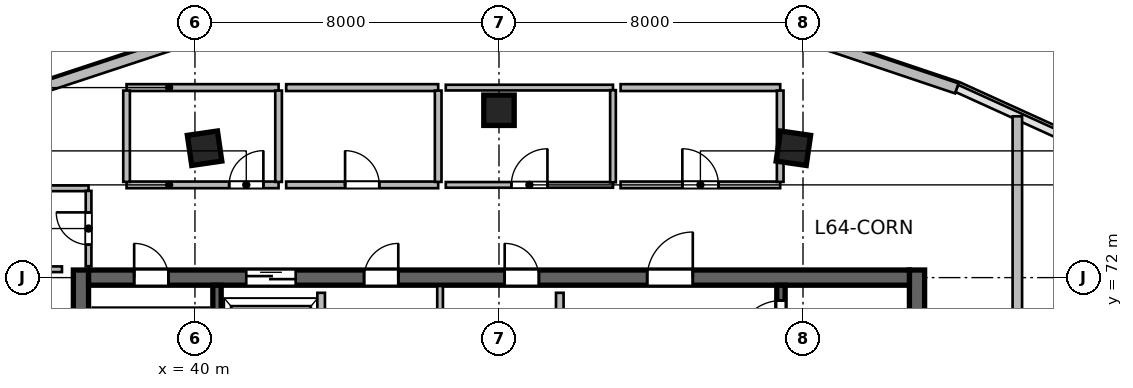
"""IFC4 building model, lengths in metres.
Left out: names, types, materials, properties, quantities, classifications, styles, units other than length and angle.
Written with IfcOpenShell. Run it as: python <this file> out.ifc"""

import sys

from ifc_helpers import new_model, si_unit, direction, frame, frame_2d, origin, origin_2d, place, context, subcontext, project, spatial, rectangle, extrude, source, transform, mapped, element, fill, save


model = new_model("IFC4")
c1 = context("Model", 3, precision=1e-05, world=origin(), true_north=direction((0.0, 1.0)))
c2 = subcontext(c1, "Body", "Model", "MODEL_VIEW")
j1 = project(units=[si_unit("LENGTHUNIT", "METRE"), si_unit("PLANEANGLEUNIT", "RADIAN")], contexts=[c1])
p1 = place(None, origin())
s1 = spatial("IfcSite", under=j1, at=p1, CompositionType="ELEMENT")
p2 = place(p1, origin())
s2 = spatial("IfcBuilding", under=s1, at=p2, CompositionType="ELEMENT")
p3 = place(p2, frame((0.0, 0.0, 264.0)))
s3 = spatial("IfcBuildingStorey", under=s2, at=p3, CompositionType="ELEMENT", Elevation=264.0)
m1 = source(origin(), c2, "Body", "SweptSolid", [
    extrude(rectangle(XDim=12.0, YDim=0.4, at=frame_2d((6.0, 0.0))), origin(), (0.0, 0.0, 1.0), 3.9),
])
for number, where, z_axis, x_axis in (
    (1, (37.0, 60.2, 0.0), (0.0, 0.0, 1.0), (0.0, 1.0, 0.0)),
    (2, (59.0, 60.2, 0.0), (0.0, 0.0, 1.0), (0.0, 1.0, 0.0)),
):
    element("IfcWall", number, at=place(p3, frame(where, z_axis=z_axis, x_axis=x_axis)), inside=s3, PredefinedType="SHEAR", context=c2, shape_type="MappedRepresentation", body=[
        mapped(m1, transform((0.0, 0.0, 0.0), scale=1.0)),
    ])
m2 = source(origin(), c2, "Body", "SweptSolid", [
    extrude(rectangle(XDim=21.6, YDim=0.4, at=frame_2d((10.8, 0.0))), origin(), (0.0, 0.0, 1.0), 3.9),
])
p4 = place(p3, frame((37.2, 72.0, 0.0), z_axis=(0.0, 0.0, 1.0), x_axis=(1.0, 0.0, 0.0)))
e3 = element("IfcWall", 3, at=p4, inside=s3, PredefinedType="SHEAR", context=c2, shape_type="MappedRepresentation", body=[
    mapped(m2, transform((0.0, 0.0, 0.0), scale=1.0)),
])
p5 = place(p4, frame((1.2, 0.0, 0.0)))
e4 = element("IfcOpeningElement", 4, at=p5, cuts=e3, PredefinedType="OPENING", context=c2, shape_type="SweptSolid", body=[
    extrude(rectangle(XDim=0.9, YDim=2.1, at=frame_2d((0.45, 1.05))), frame((0.0, 0.21, 0.0), z_axis=(0.0, -1.0, 0.0), x_axis=(1.0, 0.0, 0.0)), (0.0, 0.0, 1.0), 0.42),
])
p6 = place(p4, frame((14.7, 0.0, 0.0)))
e5 = element("IfcOpeningElement", 5, at=p6, cuts=e3, PredefinedType="OPENING", context=c2, shape_type="SweptSolid", body=[
    extrude(rectangle(XDim=1.2, YDim=2.15, at=frame_2d((0.6, 1.075))), frame((0.0, 0.21, 0.0), z_axis=(0.0, -1.0, 0.0), x_axis=(1.0, 0.0, 0.0)), (0.0, 0.0, 1.0), 0.42),
])
p7 = place(p4, frame((4.15, 0.0, 0.0)))
e6 = element("IfcOpeningElement", 6, at=p7, cuts=e3, PredefinedType="OPENING", context=c2, shape_type="SweptSolid", body=[
    extrude(rectangle(XDim=1.3, YDim=2.15, at=frame_2d((0.65, 1.075))), frame((0.0, 0.21, 0.0), z_axis=(0.0, -1.0, 0.0), x_axis=(1.0, 0.0, 0.0)), (0.0, 0.0, 1.0), 0.42),
])
p8 = place(p4, frame((7.25, 0.0, 0.0)))
e7 = element("IfcOpeningElement", 7, at=p8, cuts=e3, PredefinedType="OPENING", context=c2, shape_type="SweptSolid", body=[
    extrude(rectangle(XDim=0.9, YDim=2.1, at=frame_2d((0.45, 1.05))), frame((0.0, 0.21, 0.0), z_axis=(0.0, -1.0, 0.0), x_axis=(1.0, 0.0, 0.0)), (0.0, 0.0, 1.0), 0.42),
])
p9 = place(p4, frame((10.95, 0.0, 0.0)))
e8 = element("IfcOpeningElement", 8, at=p9, cuts=e3, PredefinedType="OPENING", context=c2, shape_type="SweptSolid", body=[
    extrude(rectangle(XDim=0.9, YDim=2.1, at=frame_2d((0.45, 1.05))), frame((0.0, 0.21, 0.0), z_axis=(0.0, -1.0, 0.0), x_axis=(1.0, 0.0, 0.0)), (0.0, 0.0, 1.0), 0.42),
])
m3 = source(origin(), c2, "Body", "SweptSolid", [
    extrude(rectangle(XDim=11.2, YDim=0.22, at=frame_2d((5.6, 0.0))), origin(), (0.0, 0.0, 1.0), 3.9),
])
p10 = place(p3, frame((40.58, 60.6, 0.0), z_axis=(0.0, 0.0, 1.0), x_axis=(0.0, 1.0, 0.0)))
e9 = element("IfcWall", 9, at=p10, inside=s3, PredefinedType="SHEAR", context=c2, shape_type="MappedRepresentation", body=[
    mapped(m3, transform((0.0, 0.0, 0.0), scale=1.0)),
])
p11 = place(p3, frame((55.42, 60.6, 0.0), z_axis=(0.0, 0.0, 1.0), x_axis=(0.0, 1.0, 0.0)))
e10 = element("IfcWall", 10, at=p11, inside=s3, PredefinedType="SHEAR", context=c2, shape_type="MappedRepresentation", body=[
    mapped(m3, transform((0.0, 0.0, 0.0), scale=1.0)),
])
p12 = place(p11, frame((9.645, 0.0, 0.0)))
e11 = element("IfcOpeningElement", 11, at=p12, cuts=e10, PredefinedType="OPENING", context=c2, shape_type="SweptSolid", body=[
    extrude(rectangle(XDim=1.15, YDim=2.15, at=frame_2d((0.575, 1.075))), frame((0.0, 0.12, 0.0), z_axis=(0.0, -1.0, 0.0), x_axis=(1.0, 0.0, 0.0)), (0.0, 0.0, 1.0), 0.24),
])
m4 = source(origin(), c2, "Body", "SweptSolid", [
    extrude(rectangle(XDim=0.8, YDim=0.8, at=origin_2d()), origin(), (0.0, 0.0, 1.0), 3.9),
])
for number, where, z_axis, x_axis in (
    (12, (40.253, 75.404, 0.0), (0.0, 0.0, 1.0), (-0.143, 0.99, 0.0)),
    (13, (48.0, 76.404, 0.0), (0.0, 0.0, 1.0), (0.0, 1.0, 0.0)),
    (14, (55.747, 75.404, 0.0), (0.0, 0.0, 1.0), (0.143, 0.99, 0.0)),
):
    element("IfcColumn", number, at=place(p3, frame(where, z_axis=z_axis, x_axis=x_axis)), inside=s3, PredefinedType="COLUMN", context=c2, shape_type="MappedRepresentation", body=[
        mapped(m4, transform((0.0, 0.0, 0.0), scale=1.0)),
    ])
m5 = source(origin(), c2, "Body", "SweptSolid", [
    extrude(rectangle(XDim=3.54, YDim=0.28, at=frame_2d((1.77, 0.0))), origin(), (0.0, 0.0, 1.0), 3.65),
])
p13 = place(p3, frame((36.132, 77.049, 0.0), z_axis=(0.0, 0.0, 1.0), x_axis=(0.949678507031, 0.313226329165, 0.0)))
e15 = element("IfcWall", 15, at=p13, inside=s3, PredefinedType="SOLIDWALL", context=c2, shape_type="MappedRepresentation", body=[
    mapped(m5, transform((0.0, 0.0, 0.0), scale=1.0)),
])
m6 = source(origin(), c2, "Body", "SweptSolid", [
    extrude(rectangle(XDim=3.543, YDim=0.28, at=frame_2d((1.771, 0.0))), origin(), (0.0, 0.0, 1.0), 3.65),
])
p14 = place(p3, frame((56.688, 78.108, 0.0), z_axis=(0.0, 0.0, 1.0), x_axis=(0.947922565312, -0.318500879389, 0.0)))
e16 = element("IfcWall", 16, at=p14, inside=s3, PredefinedType="SOLIDWALL", context=c2, shape_type="MappedRepresentation", body=[
    mapped(m6, transform((0.0, 0.0, 0.0), scale=1.0)),
])
m7 = source(origin(), c2, "Body", "SweptSolid", [
    extrude(rectangle(XDim=5.8, YDim=0.2, at=frame_2d((2.9, 0.0))), origin(), (0.0, 0.0, 1.0), 3.65),
])
p15 = place(p3, frame((49.6, 65.8, 0.0), z_axis=(0.0, 0.0, 1.0), x_axis=(0.0, 1.0, 0.0)))
e17 = element("IfcWall", 17, at=p15, inside=s3, PredefinedType="SOLIDWALL", context=c2, shape_type="MappedRepresentation", body=[
    mapped(m7, transform((0.0, 0.0, 0.0), scale=1.0)),
])
m8 = source(origin(), c2, "Body", "SweptSolid", [
    extrude(rectangle(XDim=3.2, YDim=0.2, at=frame_2d((1.6, 0.0))), origin(), (0.0, 0.0, 1.0), 3.65),
])
p16 = place(p3, frame((43.32, 68.4, 0.0), z_axis=(0.0, 0.0, 1.0), x_axis=(0.0, 1.0, 0.0)))
e18 = element("IfcWall", 18, at=p16, inside=s3, PredefinedType="SOLIDWALL", context=c2, shape_type="MappedRepresentation", body=[
    mapped(m8, transform((0.0, 0.0, 0.0), scale=1.0)),
])
m9 = source(origin(), c2, "Body", "SweptSolid", [
    extrude(rectangle(XDim=3.38, YDim=0.15, at=frame_2d((1.69, 0.0))), origin(), (0.0, 0.0, 1.0), 3.65),
])
p17 = place(p3, frame((46.45, 68.4, 0.0), z_axis=(0.0, 0.0, 1.0), x_axis=(0.0, 1.0, 0.0)))
e19 = element("IfcWall", 19, at=p17, inside=s3, PredefinedType="PARTITIONING", context=c2, shape_type="MappedRepresentation", body=[
    mapped(m9, transform((0.0, 0.0, 0.0), scale=1.0)),
])
m10 = source(origin(), c2, "Body", "SweptSolid", [
    extrude(rectangle(XDim=2.1, YDim=0.15, at=frame_2d((1.05, 0.0))), origin(), (0.0, 0.0, 1.0), 3.65),
])
p18 = place(p3, frame((34.4, 72.22, 0.0), z_axis=(0.0, 0.0, 1.0), x_axis=(1.0, 0.0, 0.0)))
e20 = element("IfcWall", 20, at=p18, inside=s3, PredefinedType="PARTITIONING", context=c2, shape_type="MappedRepresentation", body=[
    mapped(m10, transform((0.0, 0.0, 0.0), scale=1.0)),
])
m11 = source(origin(), c2, "Body", "SweptSolid", [
    extrude(rectangle(XDim=2.8, YDim=0.15, at=frame_2d((1.4, 0.0))), origin(), (0.0, 0.0, 1.0), 3.65),
])
p19 = place(p3, frame((34.4, 74.35, 0.0), z_axis=(0.0, 0.0, 1.0), x_axis=(1.0, 0.0, 0.0)))
e21 = element("IfcWall", 21, at=p19, inside=s3, PredefinedType="PARTITIONING", context=c2, shape_type="MappedRepresentation", body=[
    mapped(m11, transform((0.0, 0.0, 0.0), scale=1.0)),
])
m12 = source(origin(), c2, "Body", "SweptSolid", [
    extrude(rectangle(XDim=1.982, YDim=0.15, at=frame_2d((0.991, 0.0))), origin(), (0.0, 0.0, 1.0), 3.65),
])
p20 = place(p3, frame((37.2, 72.3, 0.0), z_axis=(0.0, 0.0, 1.0), x_axis=(0.0, 1.0, 0.0)))
e22 = element("IfcWall", 22, at=p20, inside=s3, PredefinedType="PARTITIONING", context=c2, shape_type="MappedRepresentation", body=[
    mapped(m12, transform((0.0, 0.0, 0.0), scale=1.0)),
])
p21 = place(p20, frame((0.566, 0.0, 0.0)))
e23 = element("IfcOpeningElement", 23, at=p21, cuts=e22, PredefinedType="OPENING", context=c2, shape_type="SweptSolid", body=[
    extrude(rectangle(XDim=0.85, YDim=2.1, at=frame_2d((0.425, 1.05))), frame((0.0, 0.085, 0.0), z_axis=(0.0, -1.0, 0.0), x_axis=(1.0, 0.0, 0.0)), (0.0, 0.0, 1.0), 0.17),
])
m13 = source(origin(), c2, "Body", "SweptSolid", [
    extrude(rectangle(XDim=4.0, YDim=0.175, at=frame_2d((2.0, 0.0))), origin(), (0.0, 0.0, 1.0), 3.65),
])
p22 = place(p3, frame((38.2, 74.44, 0.0), z_axis=(0.0, 0.0, 1.0), x_axis=(1.0, 0.0, 0.0)))
e24 = element("IfcWall", 24, at=p22, inside=s3, PredefinedType="PARTITIONING", context=c2, shape_type="MappedRepresentation", body=[
    mapped(m13, transform((0.0, 0.0, 0.0), scale=1.0)),
])
p23 = place(p22, frame((2.7, 0.0, 0.0)))
e25 = element("IfcOpeningElement", 25, at=p23, cuts=e24, PredefinedType="OPENING", context=c2, shape_type="SweptSolid", body=[
    extrude(rectangle(XDim=0.9, YDim=2.08, at=frame_2d((0.45, 1.04))), frame((0.0, 0.098, 0.0), z_axis=(0.0, -1.0, 0.0), x_axis=(1.0, 0.0, 0.0)), (0.0, 0.0, 1.0), 0.195),
])
m14 = source(origin(), c2, "Body", "SweptSolid", [
    extrude(rectangle(XDim=4.0, YDim=0.18, at=frame_2d((2.0, 0.0))), origin(), (0.0, 0.0, 1.0), 3.65),
])
p24 = place(p3, frame((38.2, 77.0, 0.0), z_axis=(0.0, 0.0, 1.0), x_axis=(1.0, 0.0, 0.0)))
e26 = element("IfcWall", 26, at=p24, inside=s3, PredefinedType="PLUMBINGWALL", context=c2, shape_type="MappedRepresentation", body=[
    mapped(m14, transform((0.0, 0.0, 0.0), scale=1.0)),
])
m15 = source(origin(), c2, "Body", "SweptSolid", [
    extrude(rectangle(XDim=2.403, YDim=0.175, at=frame_2d((1.201, 0.0))), origin(), (0.0, 0.0, 1.0), 3.65),
])
for number, where, z_axis, x_axis in (
    (27, (38.2, 74.519, 0.0), (0.0, 0.0, 1.0), (0.0, 1.0, 0.0)),
    (28, (42.2, 74.519, 0.0), (0.0, 0.0, 1.0), (0.0, 1.0, 0.0)),
):
    element("IfcWall", number, at=place(p3, frame(where, z_axis=z_axis, x_axis=x_axis)), inside=s3, PredefinedType="PARTITIONING", context=c2, shape_type="MappedRepresentation", body=[
        mapped(m15, transform((0.0, 0.0, 0.0), scale=1.0)),
    ])
p25 = place(p3, frame((42.4, 74.44, 0.0), z_axis=(0.0, 0.0, 1.0), x_axis=(1.0, 0.0, 0.0)))
e29 = element("IfcWall", 29, at=p25, inside=s3, PredefinedType="PARTITIONING", context=c2, shape_type="MappedRepresentation", body=[
    mapped(m13, transform((0.0, 0.0, 0.0), scale=1.0)),
])
p26 = place(p25, frame((1.55, 0.0, 0.0)))
e30 = element("IfcOpeningElement", 30, at=p26, cuts=e29, PredefinedType="OPENING", context=c2, shape_type="SweptSolid", body=[
    extrude(rectangle(XDim=0.9, YDim=2.08, at=frame_2d((0.45, 1.04))), frame((0.0, 0.098, 0.0), z_axis=(0.0, -1.0, 0.0), x_axis=(1.0, 0.0, 0.0)), (0.0, 0.0, 1.0), 0.195),
])
p27 = place(p3, frame((42.4, 77.0, 0.0), z_axis=(0.0, 0.0, 1.0), x_axis=(1.0, 0.0, 0.0)))
e31 = element("IfcWall", 31, at=p27, inside=s3, PredefinedType="PLUMBINGWALL", context=c2, shape_type="MappedRepresentation", body=[
    mapped(m14, transform((0.0, 0.0, 0.0), scale=1.0)),
])
p28 = place(p3, frame((46.4, 74.519, 0.0), z_axis=(0.0, 0.0, 1.0), x_axis=(0.0, 1.0, 0.0)))
e32 = element("IfcWall", 32, at=p28, inside=s3, PredefinedType="PARTITIONING", context=c2, shape_type="MappedRepresentation", body=[
    mapped(m15, transform((0.0, 0.0, 0.0), scale=1.0)),
])
m16 = source(origin(), c2, "Body", "SweptSolid", [
    extrude(rectangle(XDim=4.4, YDim=0.15, at=frame_2d((2.2, 0.0))), origin(), (0.0, 0.0, 1.0), 3.65),
])
p29 = place(p3, frame((46.6, 74.44, 0.0), z_axis=(0.0, 0.0, 1.0), x_axis=(1.0, 0.0, 0.0)))
e33 = element("IfcWall", 33, at=p29, inside=s3, PredefinedType="PARTITIONING", context=c2, shape_type="MappedRepresentation", body=[
    mapped(m16, transform((0.0, 0.0, 0.0), scale=1.0)),
])
p30 = place(p29, frame((1.725, 0.0, 0.0)))
e34 = element("IfcOpeningElement", 34, at=p30, cuts=e33, PredefinedType="OPENING", context=c2, shape_type="SweptSolid", body=[
    extrude(rectangle(XDim=0.95, YDim=2.1, at=frame_2d((0.475, 1.05))), frame((0.0, 0.085, 0.0), z_axis=(0.0, -1.0, 0.0), x_axis=(1.0, 0.0, 0.0)), (0.0, 0.0, 1.0), 0.17),
])
p31 = place(p3, frame((46.6, 77.0, 0.0), z_axis=(0.0, 0.0, 1.0), x_axis=(1.0, 0.0, 0.0)))
e35 = element("IfcWall", 35, at=p31, inside=s3, PredefinedType="PARTITIONING", context=c2, shape_type="MappedRepresentation", body=[
    mapped(m16, transform((0.0, 0.0, 0.0), scale=1.0)),
])
m17 = source(origin(), c2, "Body", "SweptSolid", [
    extrude(rectangle(XDim=2.425, YDim=0.15, at=frame_2d((1.212, 0.0))), origin(), (0.0, 0.0, 1.0), 3.65),
])
p32 = place(p3, frame((51.0, 74.508, 0.0), z_axis=(0.0, 0.0, 1.0), x_axis=(0.0, 1.0, 0.0)))
e36 = element("IfcWall", 36, at=p32, inside=s3, PredefinedType="PARTITIONING", context=c2, shape_type="MappedRepresentation", body=[
    mapped(m17, transform((0.0, 0.0, 0.0), scale=1.0)),
])
m18 = source(origin(), c2, "Body", "SweptSolid", [
    extrude(rectangle(XDim=4.2, YDim=0.175, at=frame_2d((2.1, 0.0))), origin(), (0.0, 0.0, 1.0), 3.65),
])
p33 = place(p3, frame((51.2, 74.44, 0.0), z_axis=(0.0, 0.0, 1.0), x_axis=(1.0, 0.0, 0.0)))
e37 = element("IfcWall", 37, at=p33, inside=s3, PredefinedType="PARTITIONING", context=c2, shape_type="MappedRepresentation", body=[
    mapped(m18, transform((0.0, 0.0, 0.0), scale=1.0)),
])
p34 = place(p33, frame((1.625, 0.0, 0.0)))
e38 = element("IfcOpeningElement", 38, at=p34, cuts=e37, PredefinedType="OPENING", context=c2, shape_type="SweptSolid", body=[
    extrude(rectangle(XDim=0.95, YDim=2.12, at=frame_2d((0.475, 1.06))), frame((0.0, 0.098, 0.0), z_axis=(0.0, -1.0, 0.0), x_axis=(1.0, 0.0, 0.0)), (0.0, 0.0, 1.0), 0.195),
])
m19 = source(origin(), c2, "Body", "SweptSolid", [
    extrude(rectangle(XDim=4.2, YDim=0.18, at=frame_2d((2.1, 0.0))), origin(), (0.0, 0.0, 1.0), 3.65),
])
p35 = place(p3, frame((51.2, 77.0, 0.0), z_axis=(0.0, 0.0, 1.0), x_axis=(1.0, 0.0, 0.0)))
e39 = element("IfcWall", 39, at=p35, inside=s3, PredefinedType="PLUMBINGWALL", context=c2, shape_type="MappedRepresentation", body=[
    mapped(m19, transform((0.0, 0.0, 0.0), scale=1.0)),
])
p36 = place(p3, frame((55.4, 74.519, 0.0), z_axis=(0.0, 0.0, 1.0), x_axis=(0.0, 1.0, 0.0)))
e40 = element("IfcWall", 40, at=p36, inside=s3, PredefinedType="PARTITIONING", context=c2, shape_type="MappedRepresentation", body=[
    mapped(m15, transform((0.0, 0.0, 0.0), scale=1.0)),
])
m20 = source(origin(), c2, "Body", "SweptSolid", [
    extrude(rectangle(XDim=11.445, YDim=0.25, at=frame_2d((5.722, 0.0))), origin(), (0.0, 0.0, 1.0), 3.65),
])
p37 = place(p3, frame((61.64, 64.8, 0.0), z_axis=(0.0, 0.0, 1.0), x_axis=(0.0, 1.0, 0.0)))
e41 = element("IfcWall", 41, at=p37, inside=s3, PredefinedType="PARTITIONING", context=c2, shape_type="MappedRepresentation", body=[
    mapped(m20, transform((0.0, 0.0, 0.0), scale=1.0)),
])
p38 = place(p37, frame((5.247, 0.0, 0.0)))
e42 = element("IfcOpeningElement", 42, at=p38, cuts=e41, PredefinedType="OPENING", context=c2, shape_type="SweptSolid", body=[
    extrude(rectangle(XDim=0.95, YDim=2.1, at=frame_2d((0.475, 1.05))), frame((0.0, 0.135, 0.0), z_axis=(0.0, -1.0, 0.0), x_axis=(1.0, 0.0, 0.0)), (0.0, 0.0, 1.0), 0.27),
])
m21 = source(origin(), c2, "Body", "SweptSolid", [
    extrude(rectangle(XDim=0.9, YDim=2.1, at=frame_2d((0.45, 1.05))), frame((0.0, 0.025, 0.0), z_axis=(0.0, -1.0, 0.0), x_axis=(1.0, 0.0, 0.0)), (0.0, 0.0, 1.0), 0.05),
])
p39 = place(p5, origin())
e43 = element("IfcDoor", 43, at=p39, inside=s3, OperationType="SINGLE_SWING_LEFT", PredefinedType="DOOR", context=c2, shape_type="MappedRepresentation", body=[
    mapped(m21, transform((0.0, 0.0, 0.0), scale=1.0)),
])
fill(e4, e43)
m22 = source(origin(), c2, "Body", "SweptSolid", [
    extrude(rectangle(XDim=1.15, YDim=2.15, at=frame_2d((0.575, 1.075))), frame((0.0, 0.025, 0.0), z_axis=(0.0, -1.0, 0.0), x_axis=(1.0, 0.0, 0.0)), (0.0, 0.0, 1.0), 0.05),
])
p40 = place(p12, origin())
e44 = element("IfcDoor", 44, at=p40, inside=s3, OperationType="SINGLE_SWING_LEFT", PredefinedType="DOOR", context=c2, shape_type="MappedRepresentation", body=[
    mapped(m22, transform((0.0, 0.0, 0.0), scale=1.0)),
])
fill(e11, e44)
m23 = source(origin(), c2, "Body", "SweptSolid", [
    extrude(rectangle(XDim=1.2, YDim=2.15, at=frame_2d((0.6, 1.075))), frame((0.0, 0.025, 0.0), z_axis=(0.0, -1.0, 0.0), x_axis=(1.0, 0.0, 0.0)), (0.0, 0.0, 1.0), 0.05),
])
p41 = place(p6, origin())
e45 = element("IfcDoor", 45, at=p41, inside=s3, OperationType="SINGLE_SWING_RIGHT", PredefinedType="DOOR", context=c2, shape_type="MappedRepresentation", body=[
    mapped(m23, transform((0.0, 0.0, 0.0), scale=1.0)),
])
fill(e5, e45)
m24 = source(origin(), c2, "Body", "SweptSolid", [
    extrude(rectangle(XDim=1.3, YDim=2.15, at=frame_2d((0.65, 1.075))), frame((0.0, 0.025, 0.0), z_axis=(0.0, -1.0, 0.0), x_axis=(1.0, 0.0, 0.0)), (0.0, 0.0, 1.0), 0.05),
])
p42 = place(p7, origin())
e46 = element("IfcDoor", 46, at=p42, inside=s3, OperationType="DOUBLE_DOOR_SLIDING", PredefinedType="DOOR", context=c2, shape_type="MappedRepresentation", body=[
    mapped(m24, transform((0.0, 0.0, 0.0), scale=1.0)),
])
fill(e6, e46)
p43 = place(p8, origin())
e47 = element("IfcDoor", 47, at=p43, inside=s3, OperationType="SINGLE_SWING_RIGHT", PredefinedType="DOOR", context=c2, shape_type="MappedRepresentation", body=[
    mapped(m21, transform((0.0, 0.0, 0.0), scale=1.0)),
])
fill(e7, e47)
p44 = place(p9, origin())
e48 = element("IfcDoor", 48, at=p44, inside=s3, OperationType="SINGLE_SWING_LEFT", PredefinedType="DOOR", context=c2, shape_type="MappedRepresentation", body=[
    mapped(m21, transform((0.0, 0.0, 0.0), scale=1.0)),
])
fill(e8, e48)
m25 = source(origin(), c2, "Body", "SweptSolid", [
    extrude(rectangle(XDim=0.85, YDim=2.1, at=frame_2d((0.425, 1.05))), frame((0.0, 0.025, 0.0), z_axis=(0.0, -1.0, 0.0), x_axis=(1.0, 0.0, 0.0)), (0.0, 0.0, 1.0), 0.05),
])
p45 = place(p21, origin())
e49 = element("IfcDoor", 49, at=p45, inside=s3, OperationType="SINGLE_SWING_RIGHT", PredefinedType="DOOR", context=c2, shape_type="MappedRepresentation", body=[
    mapped(m25, transform((0.0, 0.0, 0.0), scale=1.0)),
])
fill(e23, e49)
m26 = source(origin(), c2, "Body", "SweptSolid", [
    extrude(rectangle(XDim=0.9, YDim=2.08, at=frame_2d((0.45, 1.04))), frame((0.0, 0.025, 0.0), z_axis=(0.0, -1.0, 0.0), x_axis=(1.0, 0.0, 0.0)), (0.0, 0.0, 1.0), 0.05),
])
p46 = place(p23, origin())
e50 = element("IfcDoor", 50, at=p46, inside=s3, OperationType="SINGLE_SWING_RIGHT", PredefinedType="DOOR", context=c2, shape_type="MappedRepresentation", body=[
    mapped(m26, transform((0.0, 0.0, 0.0), scale=1.0)),
])
fill(e25, e50)
p47 = place(p26, origin())
e51 = element("IfcDoor", 51, at=p47, inside=s3, OperationType="SINGLE_SWING_LEFT", PredefinedType="DOOR", context=c2, shape_type="MappedRepresentation", body=[
    mapped(m26, transform((0.0, 0.0, 0.0), scale=1.0)),
])
fill(e30, e51)
m27 = source(origin(), c2, "Body", "SweptSolid", [
    extrude(rectangle(XDim=0.95, YDim=2.1, at=frame_2d((0.475, 1.05))), frame((0.0, 0.025, 0.0), z_axis=(0.0, -1.0, 0.0), x_axis=(1.0, 0.0, 0.0)), (0.0, 0.0, 1.0), 0.05),
])
p48 = place(p30, origin())
e52 = element("IfcDoor", 52, at=p48, inside=s3, OperationType="SINGLE_SWING_RIGHT", PredefinedType="DOOR", context=c2, shape_type="MappedRepresentation", body=[
    mapped(m27, transform((0.0, 0.0, 0.0), scale=1.0)),
])
fill(e34, e52)
m28 = source(origin(), c2, "Body", "SweptSolid", [
    extrude(rectangle(XDim=0.95, YDim=2.12, at=frame_2d((0.475, 1.06))), frame((0.0, 0.025, 0.0), z_axis=(0.0, -1.0, 0.0), x_axis=(1.0, 0.0, 0.0)), (0.0, 0.0, 1.0), 0.05),
])
p49 = place(p34, origin())
e53 = element("IfcDoor", 53, at=p49, inside=s3, OperationType="SINGLE_SWING_LEFT", PredefinedType="DOOR", context=c2, shape_type="MappedRepresentation", body=[
    mapped(m28, transform((0.0, 0.0, 0.0), scale=1.0)),
])
fill(e38, e53)
save(model, sys.argv[1])
